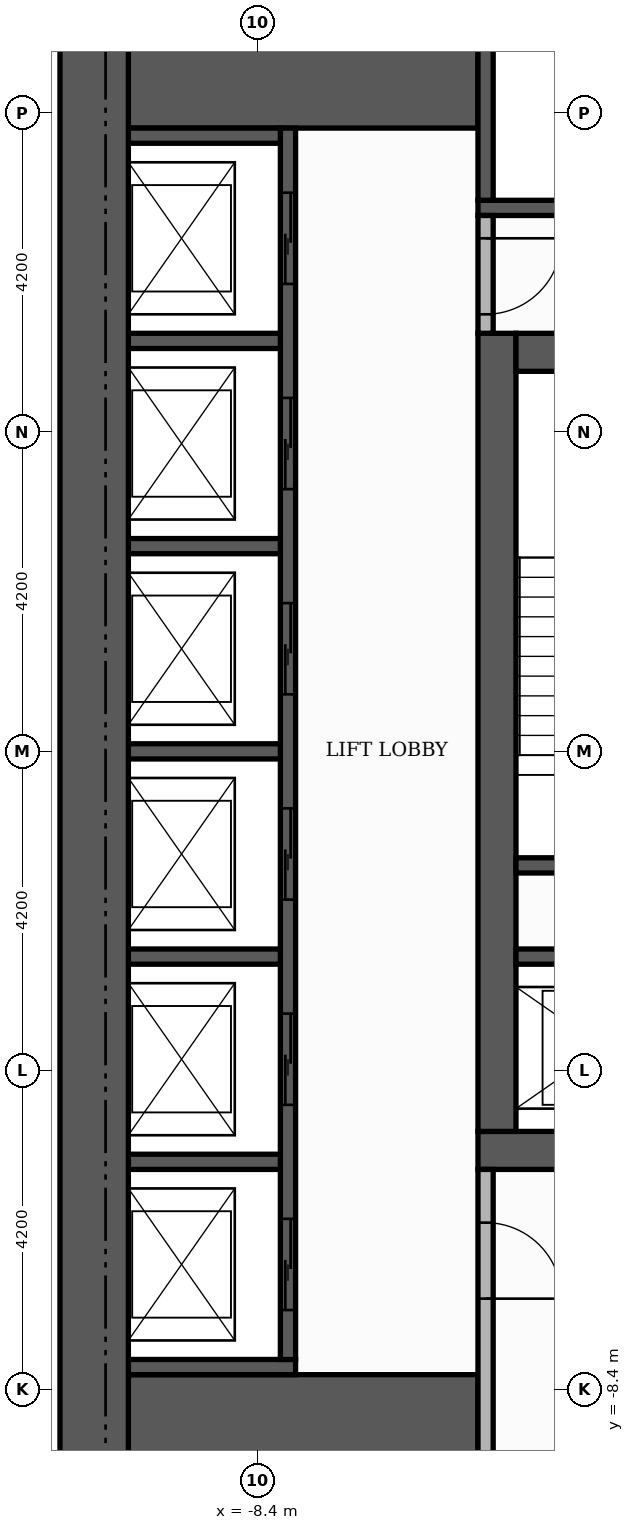
"""IFC4 building model, lengths in metres.
Left out: names, types, materials, properties, quantities, classifications, styles, units other than length and angle.
Written with IfcOpenShell. Run it as: python <this file> out.ifc"""

import sys

from ifc_helpers import new_model, si_unit, direction, frame, frame_2d, origin, place, context, subcontext, project, spatial, rectangle, extrude, element, fill, save


model = new_model("IFC4")
c1 = context("Model", 3, precision=1e-05, world=origin(), true_north=direction((0.0, 1.0)))
c2 = subcontext(c1, "Body", "Model", "MODEL_VIEW")
j1 = project(units=[si_unit("LENGTHUNIT", "METRE"), si_unit("PLANEANGLEUNIT", "RADIAN")], contexts=[c1])
p1 = place(None, origin())
s1 = spatial("IfcSite", under=j1, at=p1, CompositionType="ELEMENT")
p2 = place(p1, origin())
s2 = spatial("IfcBuilding", under=s1, at=p2, CompositionType="ELEMENT")
p3 = place(p2, frame((0.0, 0.0, 98.7)))
s3 = spatial("IfcBuildingStorey", under=s2, at=p3, CompositionType="ELEMENT", Elevation=98.7)
p4 = place(p3, frame((-5.5, -5.25, 0.0), z_axis=(0.0, 0.0, 1.0), x_axis=(1.0, 0.0, 0.0)))
e1 = element("IfcWall", 1, at=p4, inside=s3, PredefinedType="SHEAR", context=c2, shape_type="SweptSolid", body=[
    extrude(rectangle(XDim=11.0, YDim=0.5, at=frame_2d((5.5, 0.0))), origin(), (0.0, 0.0, 1.0), 3.48),
])
p5 = place(p4, frame((4.9, 0.0, 0.0)))
e2 = element("IfcOpeningElement", 2, at=p5, cuts=e1, PredefinedType="OPENING", context=c2, shape_type="SweptSolid", body=[
    extrude(rectangle(XDim=1.2, YDim=2.1, at=frame_2d((0.6, 1.05))), frame((0.0, 0.26, 0.0), z_axis=(0.0, -1.0, 0.0), x_axis=(1.0, 0.0, 0.0)), (0.0, 0.0, 1.0), 0.52),
])
p6 = place(p3, frame((-5.25, -5.0, 0.0), z_axis=(0.0, 0.0, 1.0), x_axis=(0.0, 1.0, 0.0)))
e3 = element("IfcWall", 3, at=p6, inside=s3, PredefinedType="SHEAR", context=c2, shape_type="SweptSolid", body=[
    extrude(rectangle(XDim=10.5, YDim=0.5, at=frame_2d((5.25, 0.0))), origin(), (0.0, 0.0, 1.0), 3.48),
])
p7 = place(p3, frame((-5.0, 5.25, 0.0), z_axis=(0.0, 0.0, 1.0), x_axis=(1.0, 0.0, 0.0)))
e4 = element("IfcWall", 4, at=p7, inside=s3, PredefinedType="SHEAR", context=c2, shape_type="SweptSolid", body=[
    extrude(rectangle(XDim=10.0, YDim=0.5, at=frame_2d((5.0, 0.0))), origin(), (0.0, 0.0, 1.0), 3.48),
])
p8 = place(p7, frame((4.4, 0.0, 0.0)))
e5 = element("IfcOpeningElement", 5, at=p8, cuts=e4, PredefinedType="OPENING", context=c2, shape_type="SweptSolid", body=[
    extrude(rectangle(XDim=1.2, YDim=2.1, at=frame_2d((0.6, 1.05))), frame((0.0, 0.26, 0.0), z_axis=(0.0, -1.0, 0.0), x_axis=(1.0, 0.0, 0.0)), (0.0, 0.0, 1.0), 0.52),
])
for number, where, z_axis, x_axis in (
    (6, (-10.1, -9.15, 0.0), (0.0, 0.0, 1.0), (1.0, 0.0, 0.0)),
    (7, (-10.1, 9.15, 0.0), (0.0, 0.0, 1.0), (1.0, 0.0, 0.0)),
):
    element("IfcWall", number, at=place(p3, frame(where, z_axis=z_axis, x_axis=x_axis)), inside=s3, PredefinedType="SHEAR", context=c2, shape_type="SweptSolid", body=[
        extrude(rectangle(XDim=4.6, YDim=1.9, at=frame_2d((2.3, 0.0))), origin(), (0.0, 0.0, 1.0), 3.48),
    ])
p9 = place(p3, frame((-5.0, -1.5, 0.0), z_axis=(0.0, 0.0, 1.0), x_axis=(1.0, 0.0, 0.0)))
e8 = element("IfcWall", 8, at=p9, inside=s3, PredefinedType="SHEAR", context=c2, shape_type="SweptSolid", body=[
    extrude(rectangle(XDim=3.05, YDim=0.2, at=frame_2d((1.525, 0.0))), origin(), (0.0, 0.0, 1.0), 3.48),
])
p10 = place(p3, frame((-5.5, 7.15, 0.0), z_axis=(0.0, 0.0, 1.0), x_axis=(1.0, 0.0, 0.0)))
e9 = element("IfcWall", 9, at=p10, inside=s3, PredefinedType="SHEAR", context=c2, shape_type="SweptSolid", body=[
    extrude(rectangle(XDim=6.8, YDim=0.2, at=frame_2d((3.4, 0.0))), origin(), (0.0, 0.0, 1.0), 3.48),
])
p11 = place(p3, frame((-5.4, 7.25, 0.0), z_axis=(0.0, 0.0, 1.0), x_axis=(0.0, 1.0, 0.0)))
e10 = element("IfcWall", 10, at=p11, inside=s3, PredefinedType="SHEAR", context=c2, shape_type="SweptSolid", body=[
    extrude(rectangle(XDim=2.85, YDim=0.2, at=frame_2d((1.425, 0.0))), origin(), (0.0, 0.0, 1.0), 3.48),
])
p12 = place(p3, frame((-10.1, -8.1, 0.0), z_axis=(0.0, 0.0, 1.0), x_axis=(1.0, 0.0, 0.0)))
e11 = element("IfcWall", 11, at=p12, inside=s3, PredefinedType="SHEAR", context=c2, shape_type="SweptSolid", body=[
    extrude(rectangle(XDim=2.2, YDim=0.2, at=frame_2d((1.1, 0.0))), origin(), (0.0, 0.0, 1.0), 3.48),
])
p13 = place(p3, frame((-8.0, -8.0, 0.0), z_axis=(0.0, 0.0, 1.0), x_axis=(0.0, 1.0, 0.0)))
e12 = element("IfcWall", 12, at=p13, inside=s3, PredefinedType="SHEAR", context=c2, shape_type="SweptSolid", body=[
    extrude(rectangle(XDim=16.2, YDim=0.2, at=frame_2d((8.1, 0.0))), origin(), (0.0, 0.0, 1.0), 3.48),
])
p14 = place(p13, frame((0.65, 0.0, 0.0)))
e13 = element("IfcOpeningElement", 13, at=p14, cuts=e12, PredefinedType="OPENING", context=c2, shape_type="SweptSolid", body=[
    extrude(rectangle(XDim=1.2, YDim=2.1, at=frame_2d((0.6, 1.05))), frame((0.0, 0.11, 0.0), z_axis=(0.0, -1.0, 0.0), x_axis=(1.0, 0.0, 0.0)), (0.0, 0.0, 1.0), 0.22),
])
p15 = place(p13, frame((3.35, 0.0, 0.0)))
e14 = element("IfcOpeningElement", 14, at=p15, cuts=e12, PredefinedType="OPENING", context=c2, shape_type="SweptSolid", body=[
    extrude(rectangle(XDim=1.2, YDim=2.1, at=frame_2d((0.6, 1.05))), frame((0.0, 0.11, 0.0), z_axis=(0.0, -1.0, 0.0), x_axis=(1.0, 0.0, 0.0)), (0.0, 0.0, 1.0), 0.22),
])
p16 = place(p13, frame((6.05, 0.0, 0.0)))
e15 = element("IfcOpeningElement", 15, at=p16, cuts=e12, PredefinedType="OPENING", context=c2, shape_type="SweptSolid", body=[
    extrude(rectangle(XDim=1.2, YDim=2.1, at=frame_2d((0.6, 1.05))), frame((0.0, 0.11, 0.0), z_axis=(0.0, -1.0, 0.0), x_axis=(1.0, 0.0, 0.0)), (0.0, 0.0, 1.0), 0.22),
])
p17 = place(p13, frame((8.75, 0.0, 0.0)))
e16 = element("IfcOpeningElement", 16, at=p17, cuts=e12, PredefinedType="OPENING", context=c2, shape_type="SweptSolid", body=[
    extrude(rectangle(XDim=1.2, YDim=2.1, at=frame_2d((0.6, 1.05))), frame((0.0, 0.11, 0.0), z_axis=(0.0, -1.0, 0.0), x_axis=(1.0, 0.0, 0.0)), (0.0, 0.0, 1.0), 0.22),
])
p18 = place(p13, frame((11.45, 0.0, 0.0)))
e17 = element("IfcOpeningElement", 17, at=p18, cuts=e12, PredefinedType="OPENING", context=c2, shape_type="SweptSolid", body=[
    extrude(rectangle(XDim=1.2, YDim=2.1, at=frame_2d((0.6, 1.05))), frame((0.0, 0.11, 0.0), z_axis=(0.0, -1.0, 0.0), x_axis=(1.0, 0.0, 0.0)), (0.0, 0.0, 1.0), 0.22),
])
p19 = place(p13, frame((14.15, 0.0, 0.0)))
e18 = element("IfcOpeningElement", 18, at=p19, cuts=e12, PredefinedType="OPENING", context=c2, shape_type="SweptSolid", body=[
    extrude(rectangle(XDim=1.2, YDim=2.1, at=frame_2d((0.6, 1.05))), frame((0.0, 0.11, 0.0), z_axis=(0.0, -1.0, 0.0), x_axis=(1.0, 0.0, 0.0)), (0.0, 0.0, 1.0), 0.22),
])
for number, where, z_axis, x_axis in (
    (19, (-10.1, -5.4, 0.0), (0.0, 0.0, 1.0), (1.0, 0.0, 0.0)),
    (20, (-10.1, -2.7, 0.0), (0.0, 0.0, 1.0), (1.0, 0.0, 0.0)),
):
    element("IfcWall", number, at=place(p3, frame(where, z_axis=z_axis, x_axis=x_axis)), inside=s3, PredefinedType="SHEAR", context=c2, shape_type="SweptSolid", body=[
        extrude(rectangle(XDim=2.0, YDim=0.2, at=frame_2d((1.0, 0.0))), origin(), (0.0, 0.0, 1.0), 3.48),
    ])
p20 = place(p3, frame((-5.0, -2.7, 0.0), z_axis=(0.0, 0.0, 1.0), x_axis=(1.0, 0.0, 0.0)))
e21 = element("IfcWall", 21, at=p20, inside=s3, PredefinedType="SHEAR", context=c2, shape_type="SweptSolid", body=[
    extrude(rectangle(XDim=2.85, YDim=0.2, at=frame_2d((1.425, 0.0))), origin(), (0.0, 0.0, 1.0), 3.48),
])
for number, where, z_axis, x_axis in (
    (22, (-10.1, 0.0, 0.0), (0.0, 0.0, 1.0), (1.0, 0.0, 0.0)),
    (23, (-10.1, 2.7, 0.0), (0.0, 0.0, 1.0), (1.0, 0.0, 0.0)),
    (24, (-10.1, 5.4, 0.0), (0.0, 0.0, 1.0), (1.0, 0.0, 0.0)),
    (25, (-10.1, 8.1, 0.0), (0.0, 0.0, 1.0), (1.0, 0.0, 0.0)),
):
    element("IfcWall", number, at=place(p3, frame(where, z_axis=z_axis, x_axis=x_axis)), inside=s3, PredefinedType="SHEAR", context=c2, shape_type="SweptSolid", body=[
        extrude(rectangle(XDim=2.0, YDim=0.2, at=frame_2d((1.0, 0.0))), origin(), (0.0, 0.0, 1.0), 3.48),
    ])
p21 = place(p3, frame((-10.55, -10.1, 0.0), z_axis=(0.0, 0.0, 1.0), x_axis=(0.0, 1.0, 0.0)))
e26 = element("IfcWall", 26, at=p21, inside=s3, PredefinedType="SHEAR", context=c2, shape_type="SweptSolid", body=[
    extrude(rectangle(XDim=20.2, YDim=0.9, at=frame_2d((10.1, 0.0))), origin(), (0.0, 0.0, 1.0), 3.48),
])
p22 = place(p3, frame((-5.4, -10.1, 0.0), z_axis=(0.0, 0.0, 1.0), x_axis=(0.0, 1.0, 0.0)))
e27 = element("IfcWall", 27, at=p22, inside=s3, PredefinedType="PARTITIONING", context=c2, shape_type="SweptSolid", body=[
    extrude(rectangle(XDim=4.6, YDim=0.2, at=frame_2d((2.3, 0.0))), origin(), (0.0, 0.0, 1.0), 3.48),
])
p23 = place(p22, frame((2.9, 0.0, 0.0)))
e28 = element("IfcOpeningElement", 28, at=p23, cuts=e27, PredefinedType="OPENING", context=c2, shape_type="SweptSolid", body=[
    extrude(rectangle(XDim=1.0, YDim=2.1, at=frame_2d((0.5, 1.05))), frame((0.0, 0.11, 0.0), z_axis=(0.0, -1.0, 0.0), x_axis=(1.0, 0.0, 0.0)), (0.0, 0.0, 1.0), 0.22),
])
p24 = place(p3, frame((-5.4, 5.5, 0.0), z_axis=(0.0, 0.0, 1.0), x_axis=(0.0, 1.0, 0.0)))
e29 = element("IfcWall", 29, at=p24, inside=s3, PredefinedType="PARTITIONING", context=c2, shape_type="SweptSolid", body=[
    extrude(rectangle(XDim=1.55, YDim=0.2, at=frame_2d((0.775, 0.0))), origin(), (0.0, 0.0, 1.0), 3.48),
])
p25 = place(p24, frame((0.25, 0.0, 0.0)))
e30 = element("IfcOpeningElement", 30, at=p25, cuts=e29, PredefinedType="OPENING", context=c2, shape_type="SweptSolid", body=[
    extrude(rectangle(XDim=1.0, YDim=2.1, at=frame_2d((0.5, 1.05))), frame((0.0, 0.11, 0.0), z_axis=(0.0, -1.0, 0.0), x_axis=(1.0, 0.0, 0.0)), (0.0, 0.0, 1.0), 0.22),
])
p26 = place(p14, origin())
e31 = element("IfcDoor", 31, at=p26, inside=s3, OperationType="SLIDING_TO_LEFT", PredefinedType="DOOR", context=c2, shape_type="SweptSolid", body=[
    extrude(rectangle(XDim=1.2, YDim=2.1, at=frame_2d((0.6, 1.05))), frame((0.0, 0.025, 0.0), z_axis=(0.0, -1.0, 0.0), x_axis=(1.0, 0.0, 0.0)), (0.0, 0.0, 1.0), 0.05),
])
fill(e13, e31)
p27 = place(p15, origin())
e32 = element("IfcDoor", 32, at=p27, inside=s3, OperationType="SLIDING_TO_LEFT", PredefinedType="DOOR", context=c2, shape_type="SweptSolid", body=[
    extrude(rectangle(XDim=1.2, YDim=2.1, at=frame_2d((0.6, 1.05))), frame((0.0, 0.025, 0.0), z_axis=(0.0, -1.0, 0.0), x_axis=(1.0, 0.0, 0.0)), (0.0, 0.0, 1.0), 0.05),
])
fill(e14, e32)
p28 = place(p16, origin())
e33 = element("IfcDoor", 33, at=p28, inside=s3, OperationType="SLIDING_TO_LEFT", PredefinedType="DOOR", context=c2, shape_type="SweptSolid", body=[
    extrude(rectangle(XDim=1.2, YDim=2.1, at=frame_2d((0.6, 1.05))), frame((0.0, 0.025, 0.0), z_axis=(0.0, -1.0, 0.0), x_axis=(1.0, 0.0, 0.0)), (0.0, 0.0, 1.0), 0.05),
])
fill(e15, e33)
p29 = place(p17, origin())
e34 = element("IfcDoor", 34, at=p29, inside=s3, OperationType="SLIDING_TO_LEFT", PredefinedType="DOOR", context=c2, shape_type="SweptSolid", body=[
    extrude(rectangle(XDim=1.2, YDim=2.1, at=frame_2d((0.6, 1.05))), frame((0.0, 0.025, 0.0), z_axis=(0.0, -1.0, 0.0), x_axis=(1.0, 0.0, 0.0)), (0.0, 0.0, 1.0), 0.05),
])
fill(e16, e34)
p30 = place(p18, origin())
e35 = element("IfcDoor", 35, at=p30, inside=s3, OperationType="SLIDING_TO_LEFT", PredefinedType="DOOR", context=c2, shape_type="SweptSolid", body=[
    extrude(rectangle(XDim=1.2, YDim=2.1, at=frame_2d((0.6, 1.05))), frame((0.0, 0.025, 0.0), z_axis=(0.0, -1.0, 0.0), x_axis=(1.0, 0.0, 0.0)), (0.0, 0.0, 1.0), 0.05),
])
fill(e17, e35)
p31 = place(p19, origin())
e36 = element("IfcDoor", 36, at=p31, inside=s3, OperationType="SLIDING_TO_LEFT", PredefinedType="DOOR", context=c2, shape_type="SweptSolid", body=[
    extrude(rectangle(XDim=1.2, YDim=2.1, at=frame_2d((0.6, 1.05))), frame((0.0, 0.025, 0.0), z_axis=(0.0, -1.0, 0.0), x_axis=(1.0, 0.0, 0.0)), (0.0, 0.0, 1.0), 0.05),
])
fill(e18, e36)
p32 = place(p25, frame((1.0, 0.0, 0.0), z_axis=(0.0, 0.0, 1.0), x_axis=(-1.0, 0.0, 0.0)))
e37 = element("IfcDoor", 37, at=p32, inside=s3, OperationType="SINGLE_SWING_RIGHT", PredefinedType="DOOR", context=c2, shape_type="SweptSolid", body=[
    extrude(rectangle(XDim=1.0, YDim=2.1, at=frame_2d((0.5, 1.05))), frame((0.0, 0.025, 0.0), z_axis=(0.0, -1.0, 0.0), x_axis=(1.0, 0.0, 0.0)), (0.0, 0.0, 1.0), 0.05),
])
fill(e30, e37)
p33 = place(p23, frame((1.0, 0.0, 0.0), z_axis=(0.0, 0.0, 1.0), x_axis=(-1.0, 0.0, 0.0)))
e38 = element("IfcDoor", 38, at=p33, inside=s3, OperationType="SINGLE_SWING_LEFT", PredefinedType="DOOR", context=c2, shape_type="SweptSolid", body=[
    extrude(rectangle(XDim=1.0, YDim=2.1, at=frame_2d((0.5, 1.05))), frame((0.0, 0.025, 0.0), z_axis=(0.0, -1.0, 0.0), x_axis=(1.0, 0.0, 0.0)), (0.0, 0.0, 1.0), 0.05),
])
fill(e28, e38)
save(model, sys.argv[1])
